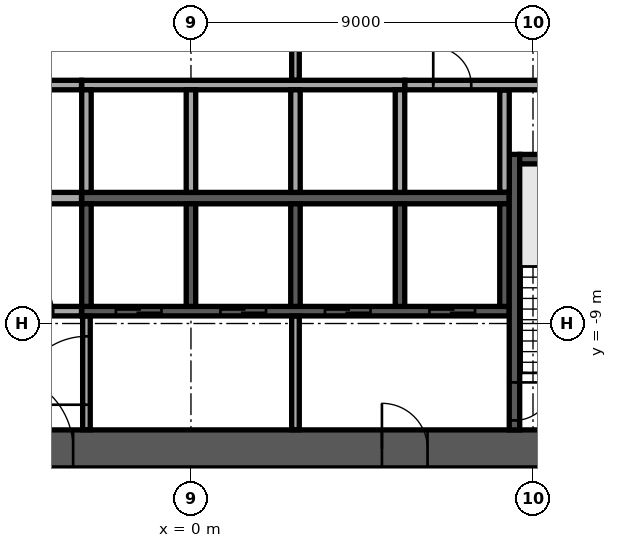
"""IFC4 building model, lengths in metres.
Left out: names, types, materials, properties, quantities, classifications, styles, units other than length and angle.
Written with IfcOpenShell. Run it as: python <this file> out.ifc"""

import sys

from ifc_helpers import new_model, si_unit, direction, frame, frame_2d, origin, place, context, subcontext, project, spatial, rectangle, extrude, element, fill, save


model = new_model("IFC4")
c1 = context("Model", 3, precision=1e-05, world=origin(), true_north=direction((0.0, 1.0)))
c2 = subcontext(c1, "Body", "Model", "MODEL_VIEW")
j1 = project(units=[si_unit("LENGTHUNIT", "METRE"), si_unit("PLANEANGLEUNIT", "RADIAN")], contexts=[c1])
p1 = place(None, origin())
s1 = spatial("IfcSite", under=j1, at=p1, CompositionType="ELEMENT")
p2 = place(p1, origin())
s2 = spatial("IfcBuilding", under=s1, at=p2, CompositionType="ELEMENT")
p3 = place(p2, frame((0.0, 0.0, 175.7)))
s3 = spatial("IfcBuildingStorey", under=s2, at=p3, CompositionType="ELEMENT", Elevation=175.7)
p4 = place(p3, frame((-12.8, -12.3, 0.0), z_axis=(0.0, 0.0, 1.0), x_axis=(1.0, 0.0, 0.0)))
e1 = element("IfcWall", 1, at=p4, inside=s3, PredefinedType="SHEAR", context=c2, shape_type="SweptSolid", body=[
    extrude(rectangle(XDim=25.6, YDim=1.0, at=frame_2d((12.8, 0.0))), origin(), (0.0, 0.0, 1.0), 3.6),
])
p5 = place(p4, frame((7.7, 0.0, 0.0)))
e2 = element("IfcOpeningElement", 2, at=p5, cuts=e1, PredefinedType="OPENING", context=c2, shape_type="SweptSolid", body=[
    extrude(rectangle(XDim=2.0, YDim=2.1, at=frame_2d((1.0, 1.05))), frame((0.0, 0.51, 0.0), z_axis=(0.0, -1.0, 0.0), x_axis=(1.0, 0.0, 0.0)), (0.0, 0.0, 1.0), 1.02),
])
p6 = place(p4, frame((17.825, 0.0, 0.0)))
e3 = element("IfcOpeningElement", 3, at=p6, cuts=e1, PredefinedType="OPENING", context=c2, shape_type="SweptSolid", body=[
    extrude(rectangle(XDim=1.2, YDim=2.1, at=frame_2d((0.6, 1.05))), frame((0.0, 0.51, 0.0), z_axis=(0.0, -1.0, 0.0), x_axis=(1.0, 0.0, 0.0)), (0.0, 0.0, 1.0), 1.02),
])
p7 = place(p4, frame((1.975, 0.0, 0.0)))
e4 = element("IfcOpeningElement", 4, at=p7, cuts=e1, PredefinedType="OPENING", context=c2, shape_type="SweptSolid", body=[
    extrude(rectangle(XDim=1.2, YDim=2.1, at=frame_2d((0.6, 1.05))), frame((0.0, 0.51, 0.0), z_axis=(0.0, -1.0, 0.0), x_axis=(1.0, 0.0, 0.0)), (0.0, 0.0, 1.0), 1.02),
])
p8 = place(p4, frame((22.425, 0.0, 0.0)))
e5 = element("IfcOpeningElement", 5, at=p8, cuts=e1, PredefinedType="OPENING", context=c2, shape_type="SweptSolid", body=[
    extrude(rectangle(XDim=1.2, YDim=2.1, at=frame_2d((0.6, 1.05))), frame((0.0, 0.51, 0.0), z_axis=(0.0, -1.0, 0.0), x_axis=(1.0, 0.0, 0.0)), (0.0, 0.0, 1.0), 1.02),
])
p9 = place(p3, frame((-2.875, -5.7, 0.0), z_axis=(0.0, 0.0, 1.0), x_axis=(1.0, 0.0, 0.0)))
e6 = element("IfcWall", 6, at=p9, inside=s3, PredefinedType="SOLIDWALL", context=c2, shape_type="SweptSolid", body=[
    extrude(rectangle(XDim=11.25, YDim=0.3, at=frame_2d((5.625, 0.0))), origin(), (0.0, 0.0, 1.0), 3.6),
])
p10 = place(p3, frame((-2.875, -2.725, 0.0), z_axis=(0.0, 0.0, 1.0), x_axis=(1.0, 0.0, 0.0)))
e7 = element("IfcWall", 7, at=p10, inside=s3, PredefinedType="SOLIDWALL", context=c2, shape_type="SweptSolid", body=[
    extrude(rectangle(XDim=8.5, YDim=0.25, at=frame_2d((4.25, 0.0))), origin(), (0.0, 0.0, 1.0), 3.6),
])
for number, where, z_axis, x_axis in (
    (8, (-2.75, -5.55, 0.0), (0.0, 0.0, 1.0), (0.0, 1.0, 0.0)),
    (9, (0.0, -5.55, 0.0), (0.0, 0.0, 1.0), (0.0, 1.0, 0.0)),
    (10, (2.75, -5.55, 0.0), (0.0, 0.0, 1.0), (0.0, 1.0, 0.0)),
    (11, (5.5, -5.55, 0.0), (0.0, 0.0, 1.0), (0.0, 1.0, 0.0)),
):
    element("IfcWall", number, at=place(p3, frame(where, z_axis=z_axis, x_axis=x_axis)), inside=s3, PredefinedType="SOLIDWALL", context=c2, shape_type="SweptSolid", body=[
        extrude(rectangle(XDim=2.7, YDim=0.25, at=frame_2d((1.35, 0.0))), origin(), (0.0, 0.0, 1.0), 3.6),
    ])
p11 = place(p3, frame((-2.875, -8.675, 0.0), z_axis=(0.0, 0.0, 1.0), x_axis=(1.0, 0.0, 0.0)))
e12 = element("IfcWall", 12, at=p11, inside=s3, PredefinedType="SOLIDWALL", context=c2, shape_type="SweptSolid", body=[
    extrude(rectangle(XDim=11.25, YDim=0.25, at=frame_2d((5.625, 0.0))), origin(), (0.0, 0.0, 1.0), 3.6),
])
p12 = place(p11, frame((0.9, 0.0, 0.0)))
e13 = element("IfcOpeningElement", 13, at=p12, cuts=e12, PredefinedType="OPENING", context=c2, shape_type="SweptSolid", body=[
    extrude(rectangle(XDim=1.2, YDim=2.1, at=frame_2d((0.6, 1.05))), frame((0.0, 0.135, 0.0), z_axis=(0.0, -1.0, 0.0), x_axis=(1.0, 0.0, 0.0)), (0.0, 0.0, 1.0), 0.27),
])
p13 = place(p11, frame((3.65, 0.0, 0.0)))
e14 = element("IfcOpeningElement", 14, at=p13, cuts=e12, PredefinedType="OPENING", context=c2, shape_type="SweptSolid", body=[
    extrude(rectangle(XDim=1.2, YDim=2.1, at=frame_2d((0.6, 1.05))), frame((0.0, 0.135, 0.0), z_axis=(0.0, -1.0, 0.0), x_axis=(1.0, 0.0, 0.0)), (0.0, 0.0, 1.0), 0.27),
])
p14 = place(p11, frame((6.4, 0.0, 0.0)))
e15 = element("IfcOpeningElement", 15, at=p14, cuts=e12, PredefinedType="OPENING", context=c2, shape_type="SweptSolid", body=[
    extrude(rectangle(XDim=1.2, YDim=2.1, at=frame_2d((0.6, 1.05))), frame((0.0, 0.135, 0.0), z_axis=(0.0, -1.0, 0.0), x_axis=(1.0, 0.0, 0.0)), (0.0, 0.0, 1.0), 0.27),
])
p15 = place(p11, frame((9.15, 0.0, 0.0)))
e16 = element("IfcOpeningElement", 16, at=p15, cuts=e12, PredefinedType="OPENING", context=c2, shape_type="SweptSolid", body=[
    extrude(rectangle(XDim=1.2, YDim=2.1, at=frame_2d((0.6, 1.05))), frame((0.0, 0.135, 0.0), z_axis=(0.0, -1.0, 0.0), x_axis=(1.0, 0.0, 0.0)), (0.0, 0.0, 1.0), 0.27),
])
for number, where, z_axis, x_axis in (
    (17, (-2.75, -8.55, 0.0), (0.0, 0.0, 1.0), (0.0, 1.0, 0.0)),
    (18, (0.0, -8.55, 0.0), (0.0, 0.0, 1.0), (0.0, 1.0, 0.0)),
    (19, (2.75, -8.55, 0.0), (0.0, 0.0, 1.0), (0.0, 1.0, 0.0)),
    (20, (5.5, -8.55, 0.0), (0.0, 0.0, 1.0), (0.0, 1.0, 0.0)),
    (21, (8.25, -8.55, 0.0), (0.0, 0.0, 1.0), (0.0, 1.0, 0.0)),
):
    element("IfcWall", number, at=place(p3, frame(where, z_axis=z_axis, x_axis=x_axis)), inside=s3, PredefinedType="SOLIDWALL", context=c2, shape_type="SweptSolid", body=[
        extrude(rectangle(XDim=2.7, YDim=0.25, at=frame_2d((1.35, 0.0))), origin(), (0.0, 0.0, 1.0), 3.6),
    ])
p16 = place(p3, frame((8.512, -4.55, 0.0), z_axis=(0.0, 0.0, 1.0), x_axis=(0.0, -1.0, 0.0)))
e22 = element("IfcWall", 22, at=p16, inside=s3, PredefinedType="SOLIDWALL", context=c2, shape_type="SweptSolid", body=[
    extrude(rectangle(XDim=7.25, YDim=0.275, at=frame_2d((3.625, 0.0))), origin(), (0.0, 0.0, 1.0), 3.6),
])
p17 = place(p16, frame((6.0, 0.0, 0.0)))
e23 = element("IfcOpeningElement", 23, at=p17, cuts=e22, PredefinedType="OPENING", context=c2, shape_type="SweptSolid", body=[
    extrude(rectangle(XDim=1.0, YDim=2.1, at=frame_2d((0.5, 1.05))), frame((0.0, 0.147, 0.0), z_axis=(0.0, -1.0, 0.0), x_axis=(1.0, 0.0, 0.0)), (0.0, 0.0, 1.0), 0.295),
])
p18 = place(p3, frame((8.65, -4.675, 0.0), z_axis=(0.0, 0.0, 1.0), x_axis=(1.0, 0.0, 0.0)))
e24 = element("IfcWall", 24, at=p18, inside=s3, PredefinedType="SOLIDWALL", context=c2, shape_type="SweptSolid", body=[
    extrude(rectangle(XDim=3.15, YDim=0.25, at=frame_2d((1.575, 0.0))), origin(), (0.0, 0.0, 1.0), 3.6),
])
p19 = place(p3, frame((-2.75, -11.795, 0.0), z_axis=(0.0, 0.0, 1.0), x_axis=(0.0, 1.0, 0.0)))
e25 = element("IfcWall", 25, at=p19, inside=s3, PredefinedType="PARTITIONING", context=c2, shape_type="SweptSolid", body=[
    extrude(rectangle(XDim=2.99, YDim=0.2, at=frame_2d((1.495, 0.0))), origin(), (0.0, 0.0, 1.0), 3.6),
])
p20 = place(p19, frame((0.657, 0.0, 0.0)))
e26 = element("IfcOpeningElement", 26, at=p20, cuts=e25, PredefinedType="OPENING", context=c2, shape_type="SweptSolid", body=[
    extrude(rectangle(XDim=1.8, YDim=2.1, at=frame_2d((0.9, 1.05))), frame((0.0, 0.11, 0.0), z_axis=(0.0, -1.0, 0.0), x_axis=(1.0, 0.0, 0.0)), (0.0, 0.0, 1.0), 0.22),
])
p21 = place(p3, frame((2.75, -11.795, 0.0), z_axis=(0.0, 0.0, 1.0), x_axis=(0.0, 1.0, 0.0)))
e27 = element("IfcWall", 27, at=p21, inside=s3, PredefinedType="PARTITIONING", context=c2, shape_type="SweptSolid", body=[
    extrude(rectangle(XDim=2.99, YDim=0.2, at=frame_2d((1.495, 0.0))), origin(), (0.0, 0.0, 1.0), 3.6),
])
p22 = place(p3, frame((-8.37, -8.675, 0.0), z_axis=(0.0, 0.0, 1.0), x_axis=(1.0, 0.0, 0.0)))
e28 = element("IfcWall", 28, at=p22, inside=s3, PredefinedType="PARTITIONING", context=c2, shape_type="SweptSolid", body=[
    extrude(rectangle(XDim=5.49, YDim=0.25, at=frame_2d((2.745, 0.0))), origin(), (0.0, 0.0, 1.0), 3.6),
])
p23 = place(p22, frame((0.995, 0.0, 0.0)))
e29 = element("IfcOpeningElement", 29, at=p23, cuts=e28, PredefinedType="OPENING", context=c2, shape_type="SweptSolid", body=[
    extrude(rectangle(XDim=1.0, YDim=2.1, at=frame_2d((0.5, 1.05))), frame((0.0, 0.135, 0.0), z_axis=(0.0, -1.0, 0.0), x_axis=(1.0, 0.0, 0.0)), (0.0, 0.0, 1.0), 0.27),
])
p24 = place(p22, frame((3.745, 0.0, 0.0)))
e30 = element("IfcOpeningElement", 30, at=p24, cuts=e28, PredefinedType="OPENING", context=c2, shape_type="SweptSolid", body=[
    extrude(rectangle(XDim=1.0, YDim=2.1, at=frame_2d((0.5, 1.05))), frame((0.0, 0.135, 0.0), z_axis=(0.0, -1.0, 0.0), x_axis=(1.0, 0.0, 0.0)), (0.0, 0.0, 1.0), 0.27),
])
p25 = place(p3, frame((-8.35, -5.7, 0.0), z_axis=(0.0, 0.0, 1.0), x_axis=(1.0, 0.0, 0.0)))
e31 = element("IfcWall", 31, at=p25, inside=s3, PredefinedType="PARTITIONING", context=c2, shape_type="SweptSolid", body=[
    extrude(rectangle(XDim=5.47, YDim=0.3, at=frame_2d((2.735, 0.0))), origin(), (0.0, 0.0, 1.0), 3.6),
])
p26 = place(p3, frame((8.25, -5.545, 0.0), z_axis=(0.0, 0.0, 1.0), x_axis=(0.0, 1.0, 0.0)))
e32 = element("IfcWall", 32, at=p26, inside=s3, PredefinedType="PARTITIONING", context=c2, shape_type="SweptSolid", body=[
    extrude(rectangle(XDim=2.69, YDim=0.25, at=frame_2d((1.345, 0.0))), origin(), (0.0, 0.0, 1.0), 3.6),
])
p27 = place(p3, frame((-11.795, -2.725, 0.0), z_axis=(0.0, 0.0, 1.0), x_axis=(1.0, 0.0, 0.0)))
e33 = element("IfcWall", 33, at=p27, inside=s3, PredefinedType="PARTITIONING", context=c2, shape_type="SweptSolid", body=[
    extrude(rectangle(XDim=8.915, YDim=0.25, at=frame_2d((4.458, 0.0))), origin(), (0.0, 0.0, 1.0), 3.6),
])
p28 = place(p27, frame((1.295, 0.0, 0.0)))
e34 = element("IfcOpeningElement", 34, at=p28, cuts=e33, PredefinedType="OPENING", context=c2, shape_type="SweptSolid", body=[
    extrude(rectangle(XDim=1.0, YDim=2.1, at=frame_2d((0.5, 1.05))), frame((0.0, 0.135, 0.0), z_axis=(0.0, -1.0, 0.0), x_axis=(1.0, 0.0, 0.0)), (0.0, 0.0, 1.0), 0.27),
])
p29 = place(p27, frame((4.42, 0.0, 0.0)))
e35 = element("IfcOpeningElement", 35, at=p29, cuts=e33, PredefinedType="OPENING", context=c2, shape_type="SweptSolid", body=[
    extrude(rectangle(XDim=1.0, YDim=2.1, at=frame_2d((0.5, 1.05))), frame((0.0, 0.135, 0.0), z_axis=(0.0, -1.0, 0.0), x_axis=(1.0, 0.0, 0.0)), (0.0, 0.0, 1.0), 0.27),
])
p30 = place(p3, frame((5.63, -2.725, 0.0), z_axis=(0.0, 0.0, 1.0), x_axis=(1.0, 0.0, 0.0)))
e36 = element("IfcWall", 36, at=p30, inside=s3, PredefinedType="PARTITIONING", context=c2, shape_type="SweptSolid", body=[
    extrude(rectangle(XDim=6.165, YDim=0.25, at=frame_2d((3.083, 0.0))), origin(), (0.0, 0.0, 1.0), 3.6),
])
p31 = place(p30, frame((0.745, 0.0, 0.0)))
e37 = element("IfcOpeningElement", 37, at=p31, cuts=e36, PredefinedType="OPENING", context=c2, shape_type="SweptSolid", body=[
    extrude(rectangle(XDim=1.0, YDim=2.1, at=frame_2d((0.5, 1.05))), frame((0.0, 0.135, 0.0), z_axis=(0.0, -1.0, 0.0), x_axis=(1.0, 0.0, 0.0)), (0.0, 0.0, 1.0), 0.27),
])
p32 = place(p30, frame((3.92, 0.0, 0.0)))
e38 = element("IfcOpeningElement", 38, at=p32, cuts=e36, PredefinedType="OPENING", context=c2, shape_type="SweptSolid", body=[
    extrude(rectangle(XDim=0.9, YDim=2.1, at=frame_2d((0.45, 1.05))), frame((0.0, 0.135, 0.0), z_axis=(0.0, -1.0, 0.0), x_axis=(1.0, 0.0, 0.0)), (0.0, 0.0, 1.0), 0.27),
])
p33 = place(p3, frame((2.75, -2.595, 0.0), z_axis=(0.0, 0.0, 1.0), x_axis=(0.0, 1.0, 0.0)))
e39 = element("IfcWall", 39, at=p33, inside=s3, PredefinedType="PARTITIONING", context=c2, shape_type="SweptSolid", body=[
    extrude(rectangle(XDim=5.19, YDim=0.2, at=frame_2d((2.595, 0.0))), origin(), (0.0, 0.0, 1.0), 3.6),
])
p34 = place(p33, frame((1.395, 0.0, 0.0)))
e40 = element("IfcOpeningElement", 40, at=p34, cuts=e39, PredefinedType="OPENING", context=c2, shape_type="SweptSolid", body=[
    extrude(rectangle(XDim=2.4, YDim=2.4, at=frame_2d((1.2, 1.2))), frame((0.0, 0.11, 0.0), z_axis=(0.0, -1.0, 0.0), x_axis=(1.0, 0.0, 0.0)), (0.0, 0.0, 1.0), 0.22),
])
p35 = place(p3, frame((-3.534, -35.882, 0.0), z_axis=(0.0, 0.0, 1.0), x_axis=(0.788011205374, 0.61566089709, 0.0)))
e41 = element("IfcWall", 41, at=p35, inside=s3, PredefinedType="STANDARD", context=c2, shape_type="SweptSolid", body=[
    extrude(rectangle(XDim=49.752, YDim=0.6, at=frame_2d((24.876, 0.0))), origin(), (0.0, 0.0, 1.0), 3.6),
])
p36 = place(p35, frame((1.161, 0.0, 0.9)))
e42 = element("IfcOpeningElement", 42, at=p36, cuts=e41, PredefinedType="OPENING", context=c2, shape_type="SweptSolid", body=[
    extrude(rectangle(XDim=2.1, YDim=2.1, at=frame_2d((1.05, 1.05))), frame((0.0, 0.31, 0.0), z_axis=(0.0, -1.0, 0.0), x_axis=(1.0, 0.0, 0.0)), (0.0, 0.0, 1.0), 0.62),
])
p37 = place(p35, frame((5.644, 0.0, 0.9)))
e43 = element("IfcOpeningElement", 43, at=p37, cuts=e41, PredefinedType="OPENING", context=c2, shape_type="SweptSolid", body=[
    extrude(rectangle(XDim=2.1, YDim=2.1, at=frame_2d((1.05, 1.05))), frame((0.0, 0.31, 0.0), z_axis=(0.0, -1.0, 0.0), x_axis=(1.0, 0.0, 0.0)), (0.0, 0.0, 1.0), 0.62),
])
p38 = place(p35, frame((10.189, 0.0, 0.9)))
e44 = element("IfcOpeningElement", 44, at=p38, cuts=e41, PredefinedType="OPENING", context=c2, shape_type="SweptSolid", body=[
    extrude(rectangle(XDim=2.1, YDim=2.1, at=frame_2d((1.05, 1.05))), frame((0.0, 0.31, 0.0), z_axis=(0.0, -1.0, 0.0), x_axis=(1.0, 0.0, 0.0)), (0.0, 0.0, 1.0), 0.62),
])
p39 = place(p35, frame((14.735, 0.0, 0.9)))
e45 = element("IfcOpeningElement", 45, at=p39, cuts=e41, PredefinedType="OPENING", context=c2, shape_type="SweptSolid", body=[
    extrude(rectangle(XDim=2.1, YDim=2.1, at=frame_2d((1.05, 1.05))), frame((0.0, 0.31, 0.0), z_axis=(0.0, -1.0, 0.0), x_axis=(1.0, 0.0, 0.0)), (0.0, 0.0, 1.0), 0.62),
])
p40 = place(p35, frame((19.28, 0.0, 0.9)))
e46 = element("IfcOpeningElement", 46, at=p40, cuts=e41, PredefinedType="OPENING", context=c2, shape_type="SweptSolid", body=[
    extrude(rectangle(XDim=2.1, YDim=2.1, at=frame_2d((1.05, 1.05))), frame((0.0, 0.31, 0.0), z_axis=(0.0, -1.0, 0.0), x_axis=(1.0, 0.0, 0.0)), (0.0, 0.0, 1.0), 0.62),
])
p41 = place(p35, frame((23.826, 0.0, 0.9)))
e47 = element("IfcOpeningElement", 47, at=p41, cuts=e41, PredefinedType="OPENING", context=c2, shape_type="SweptSolid", body=[
    extrude(rectangle(XDim=2.1, YDim=2.1, at=frame_2d((1.05, 1.05))), frame((0.0, 0.31, 0.0), z_axis=(0.0, -1.0, 0.0), x_axis=(1.0, 0.0, 0.0)), (0.0, 0.0, 1.0), 0.62),
])
p42 = place(p35, frame((28.371, 0.0, 0.9)))
e48 = element("IfcOpeningElement", 48, at=p42, cuts=e41, PredefinedType="OPENING", context=c2, shape_type="SweptSolid", body=[
    extrude(rectangle(XDim=2.1, YDim=2.1, at=frame_2d((1.05, 1.05))), frame((0.0, 0.31, 0.0), z_axis=(0.0, -1.0, 0.0), x_axis=(1.0, 0.0, 0.0)), (0.0, 0.0, 1.0), 0.62),
])
p43 = place(p35, frame((32.917, 0.0, 0.9)))
e49 = element("IfcOpeningElement", 49, at=p43, cuts=e41, PredefinedType="OPENING", context=c2, shape_type="SweptSolid", body=[
    extrude(rectangle(XDim=2.1, YDim=2.1, at=frame_2d((1.05, 1.05))), frame((0.0, 0.31, 0.0), z_axis=(0.0, -1.0, 0.0), x_axis=(1.0, 0.0, 0.0)), (0.0, 0.0, 1.0), 0.62),
])
p44 = place(p35, frame((37.462, 0.0, 0.9)))
e50 = element("IfcOpeningElement", 50, at=p44, cuts=e41, PredefinedType="OPENING", context=c2, shape_type="SweptSolid", body=[
    extrude(rectangle(XDim=2.1, YDim=2.1, at=frame_2d((1.05, 1.05))), frame((0.0, 0.31, 0.0), z_axis=(0.0, -1.0, 0.0), x_axis=(1.0, 0.0, 0.0)), (0.0, 0.0, 1.0), 0.62),
])
p45 = place(p35, frame((42.008, 0.0, 0.9)))
e51 = element("IfcOpeningElement", 51, at=p45, cuts=e41, PredefinedType="OPENING", context=c2, shape_type="SweptSolid", body=[
    extrude(rectangle(XDim=2.1, YDim=2.1, at=frame_2d((1.05, 1.05))), frame((0.0, 0.31, 0.0), z_axis=(0.0, -1.0, 0.0), x_axis=(1.0, 0.0, 0.0)), (0.0, 0.0, 1.0), 0.62),
])
p46 = place(p35, frame((46.491, 0.0, 0.9)))
e52 = element("IfcOpeningElement", 52, at=p46, cuts=e41, PredefinedType="OPENING", context=c2, shape_type="SweptSolid", body=[
    extrude(rectangle(XDim=2.1, YDim=2.1, at=frame_2d((1.05, 1.05))), frame((0.0, 0.31, 0.0), z_axis=(0.0, -1.0, 0.0), x_axis=(1.0, 0.0, 0.0)), (0.0, 0.0, 1.0), 0.62),
])
p47 = place(p3, frame((-0.348, -25.095, 0.0), z_axis=(0.0, 0.0, 1.0), x_axis=(0.788010131951, 0.615662271008, 0.0)))
e53 = element("IfcWall", 53, at=p47, inside=s3, PredefinedType="PARTITIONING", context=c2, shape_type="SweptSolid", body=[
    extrude(rectangle(XDim=31.448, YDim=0.15, at=frame_2d((15.724, 0.0))), origin(), (0.0, 0.0, 1.0), 3.15),
])
p48 = place(p47, frame((4.801, 0.0, 0.0)))
e54 = element("IfcOpeningElement", 54, at=p48, cuts=e53, PredefinedType="OPENING", context=c2, shape_type="SweptSolid", body=[
    extrude(rectangle(XDim=1.8, YDim=2.1, at=frame_2d((0.9, 1.05))), frame((0.0, 0.085, 0.0), z_axis=(0.0, -1.0, 0.0), x_axis=(1.0, 0.0, 0.0)), (0.0, 0.0, 1.0), 0.17),
])
p49 = place(p47, frame((0.301, 0.0, 0.0)))
e55 = element("IfcOpeningElement", 55, at=p49, cuts=e53, PredefinedType="OPENING", context=c2, shape_type="SweptSolid", body=[
    extrude(rectangle(XDim=1.0, YDim=2.1, at=frame_2d((0.5, 1.05))), frame((0.0, 0.085, 0.0), z_axis=(0.0, -1.0, 0.0), x_axis=(1.0, 0.0, 0.0)), (0.0, 0.0, 1.0), 0.17),
])
p50 = place(p47, frame((19.226, 0.0, 0.0)))
e56 = element("IfcOpeningElement", 56, at=p50, cuts=e53, PredefinedType="OPENING", context=c2, shape_type="SweptSolid", body=[
    extrude(rectangle(XDim=1.0, YDim=2.1, at=frame_2d((0.5, 1.05))), frame((0.0, 0.085, 0.0), z_axis=(0.0, -1.0, 0.0), x_axis=(1.0, 0.0, 0.0)), (0.0, 0.0, 1.0), 0.17),
])
p51 = place(p47, frame((30.072, 0.0, 0.0)))
e57 = element("IfcOpeningElement", 57, at=p51, cuts=e53, PredefinedType="OPENING", context=c2, shape_type="SweptSolid", body=[
    extrude(rectangle(XDim=1.0, YDim=2.1, at=frame_2d((0.5, 1.05))), frame((0.0, 0.085, 0.0), z_axis=(0.0, -1.0, 0.0), x_axis=(1.0, 0.0, 0.0)), (0.0, 0.0, 1.0), 0.17),
])
p52 = place(p5, origin())
e58 = element("IfcDoor", 58, at=p52, inside=s3, OperationType="SINGLE_SWING_LEFT", PredefinedType="DOOR", context=c2, shape_type="SweptSolid", body=[
    extrude(rectangle(XDim=2.0, YDim=2.1, at=frame_2d((1.0, 1.05))), frame((0.0, 0.025, 0.0), z_axis=(0.0, -1.0, 0.0), x_axis=(1.0, 0.0, 0.0)), (0.0, 0.0, 1.0), 0.05),
])
fill(e2, e58)
p53 = place(p6, origin())
e59 = element("IfcDoor", 59, at=p53, inside=s3, OperationType="SINGLE_SWING_LEFT", PredefinedType="DOOR", context=c2, shape_type="SweptSolid", body=[
    extrude(rectangle(XDim=1.2, YDim=2.1, at=frame_2d((0.6, 1.05))), frame((0.0, 0.025, 0.0), z_axis=(0.0, -1.0, 0.0), x_axis=(1.0, 0.0, 0.0)), (0.0, 0.0, 1.0), 0.05),
])
fill(e3, e59)
p54 = place(p12, origin())
e60 = element("IfcDoor", 60, at=p54, inside=s3, OperationType="DOUBLE_DOOR_SLIDING", PredefinedType="DOOR", context=c2, shape_type="SweptSolid", body=[
    extrude(rectangle(XDim=1.2, YDim=2.1, at=frame_2d((0.6, 1.05))), frame((0.0, 0.025, 0.0), z_axis=(0.0, -1.0, 0.0), x_axis=(1.0, 0.0, 0.0)), (0.0, 0.0, 1.0), 0.05),
])
fill(e13, e60)
p55 = place(p13, origin())
e61 = element("IfcDoor", 61, at=p55, inside=s3, OperationType="DOUBLE_DOOR_SLIDING", PredefinedType="DOOR", context=c2, shape_type="SweptSolid", body=[
    extrude(rectangle(XDim=1.2, YDim=2.1, at=frame_2d((0.6, 1.05))), frame((0.0, 0.025, 0.0), z_axis=(0.0, -1.0, 0.0), x_axis=(1.0, 0.0, 0.0)), (0.0, 0.0, 1.0), 0.05),
])
fill(e14, e61)
p56 = place(p14, origin())
e62 = element("IfcDoor", 62, at=p56, inside=s3, OperationType="DOUBLE_DOOR_SLIDING", PredefinedType="DOOR", context=c2, shape_type="SweptSolid", body=[
    extrude(rectangle(XDim=1.2, YDim=2.1, at=frame_2d((0.6, 1.05))), frame((0.0, 0.025, 0.0), z_axis=(0.0, -1.0, 0.0), x_axis=(1.0, 0.0, 0.0)), (0.0, 0.0, 1.0), 0.05),
])
fill(e15, e62)
p57 = place(p15, origin())
e63 = element("IfcDoor", 63, at=p57, inside=s3, OperationType="DOUBLE_DOOR_SLIDING", PredefinedType="DOOR", context=c2, shape_type="SweptSolid", body=[
    extrude(rectangle(XDim=1.2, YDim=2.1, at=frame_2d((0.6, 1.05))), frame((0.0, 0.025, 0.0), z_axis=(0.0, -1.0, 0.0), x_axis=(1.0, 0.0, 0.0)), (0.0, 0.0, 1.0), 0.05),
])
fill(e16, e63)
p58 = place(p17, origin())
e64 = element("IfcDoor", 64, at=p58, inside=s3, OperationType="SINGLE_SWING_LEFT", PredefinedType="DOOR", context=c2, shape_type="SweptSolid", body=[
    extrude(rectangle(XDim=1.0, YDim=2.1, at=frame_2d((0.5, 1.05))), frame((0.0, 0.025, 0.0), z_axis=(0.0, -1.0, 0.0), x_axis=(1.0, 0.0, 0.0)), (0.0, 0.0, 1.0), 0.05),
])
fill(e23, e64)
p59 = place(p24, origin())
e65 = element("IfcDoor", 65, at=p59, inside=s3, OperationType="SINGLE_SWING_RIGHT", PredefinedType="DOOR", context=c2, shape_type="SweptSolid", body=[
    extrude(rectangle(XDim=1.0, YDim=2.1, at=frame_2d((0.5, 1.05))), frame((0.0, 0.025, 0.0), z_axis=(0.0, -1.0, 0.0), x_axis=(1.0, 0.0, 0.0)), (0.0, 0.0, 1.0), 0.05),
])
fill(e30, e65)
p60 = place(p31, origin())
e66 = element("IfcDoor", 66, at=p60, inside=s3, OperationType="SINGLE_SWING_RIGHT", PredefinedType="DOOR", context=c2, shape_type="SweptSolid", body=[
    extrude(rectangle(XDim=1.0, YDim=2.1, at=frame_2d((0.5, 1.05))), frame((0.0, 0.025, 0.0), z_axis=(0.0, -1.0, 0.0), x_axis=(1.0, 0.0, 0.0)), (0.0, 0.0, 1.0), 0.05),
])
fill(e37, e66)
p61 = place(p20, origin())
e67 = element("IfcDoor", 67, at=p61, inside=s3, OperationType="SINGLE_SWING_LEFT", PredefinedType="DOOR", context=c2, shape_type="SweptSolid", body=[
    extrude(rectangle(XDim=1.8, YDim=2.1, at=frame_2d((0.9, 1.05))), frame((0.0, 0.025, 0.0), z_axis=(0.0, -1.0, 0.0), x_axis=(1.0, 0.0, 0.0)), (0.0, 0.0, 1.0), 0.05),
])
fill(e26, e67)
save(model, sys.argv[1])
